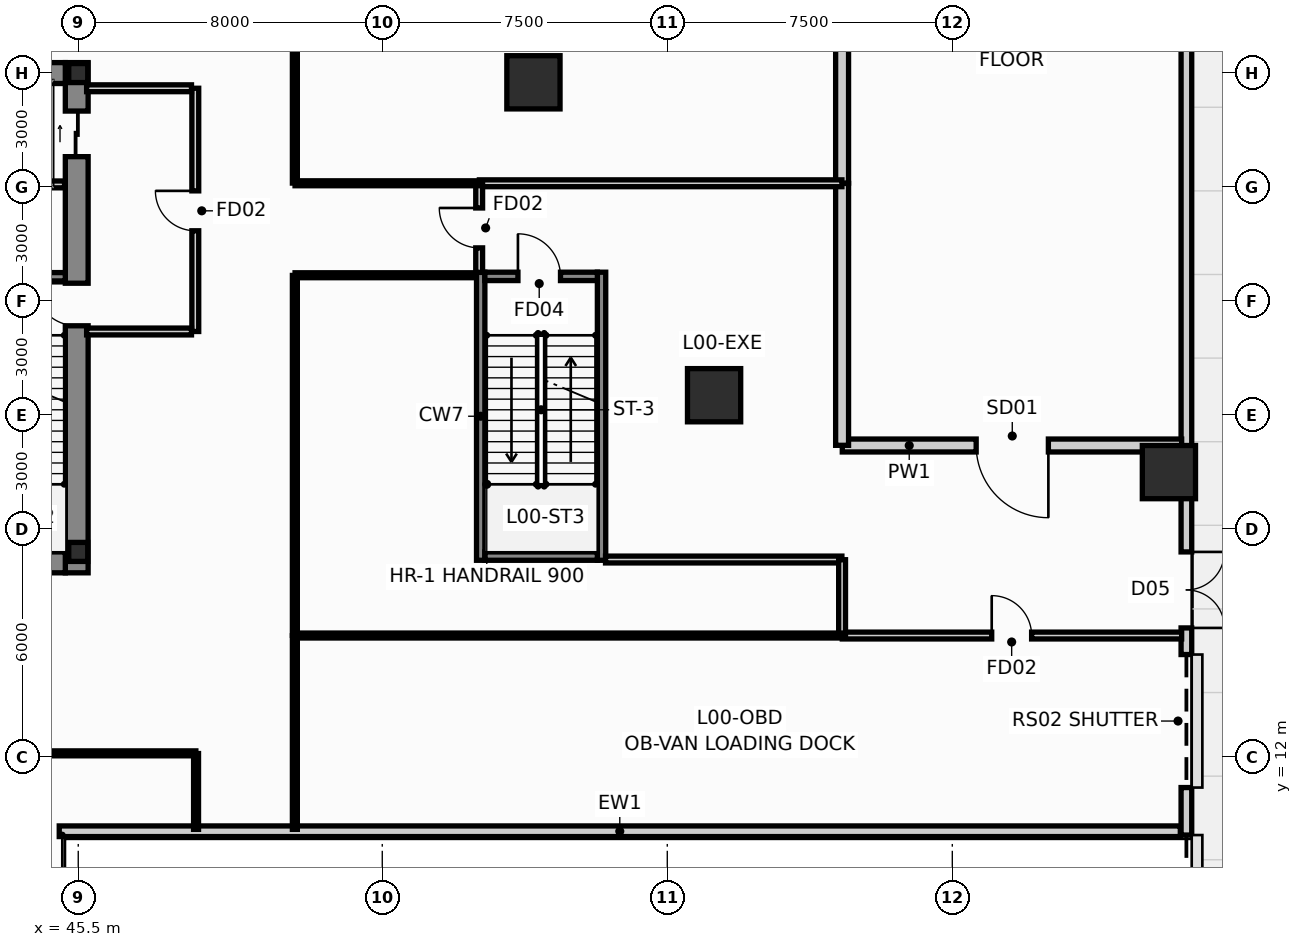
"""IFC4 building model, lengths in metres.
Left out: names, types, materials, properties, quantities, classifications, styles, units other than length and angle.
Written with IfcOpenShell. Run it as: python <this file> out.ifc"""

import sys

from ifc_helpers import new_model, si_unit, direction, frame, frame_2d, origin, origin_2d, place, context, subcontext, project, spatial, rectangle, hollow_rectangle, i_section, extrude, source, transform, mapped, element, fill, save


model = new_model("IFC4")
c1 = context("Model", 3, precision=1e-05, world=origin(), true_north=direction((0.0, 1.0)))
c2 = subcontext(c1, "Body", "Model", "MODEL_VIEW")
j1 = project(units=[si_unit("LENGTHUNIT", "METRE"), si_unit("PLANEANGLEUNIT", "RADIAN")], contexts=[c1])
p1 = place(None, origin())
s1 = spatial("IfcSite", under=j1, at=p1, CompositionType="ELEMENT")
p2 = place(p1, origin())
s2 = spatial("IfcBuilding", under=s1, at=p2, CompositionType="ELEMENT")
p3 = place(p2, origin())
s3 = spatial("IfcBuildingStorey", under=s2, at=p3, CompositionType="ELEMENT", Elevation=0.0)
m1 = source(origin(), c2, "Body", "SweptSolid", [
    extrude(i_section(OverallWidth=0.5, OverallDepth=0.5, WebThickness=0.028, FlangeThickness=0.04, at=origin_2d()), origin(), (0.0, 0.0, 1.0), 5.4),
])
for number, where, z_axis, x_axis in (
    (1, (45.5, 17.4, 0.0), (0.0, 0.0, 1.0), (1.0, 0.0, 0.0)),
    (2, (45.5, 30.0, 0.0), (0.0, 0.0, 1.0), (1.0, 0.0, 0.0)),
):
    element("IfcColumn", number, at=place(p3, frame(where, z_axis=z_axis, x_axis=x_axis)), inside=s3, PredefinedType="COLUMN", context=c2, shape_type="MappedRepresentation", body=[
        mapped(m1, transform((0.0, 0.0, 0.0), scale=1.0)),
    ])
p4 = place(p3, frame((45.46, 16.85, 0.0), z_axis=(0.0, 0.0, 1.0), x_axis=(0.0, 1.0, 0.0)))
e3 = element("IfcWall", 3, at=p4, inside=s3, PredefinedType="SHEAR", context=c2, shape_type="SweptSolid", body=[
    extrude(rectangle(XDim=13.425, YDim=0.6, at=frame_2d((6.712, 0.0))), origin(), (0.0, 0.0, 1.0), 5.4),
])
p5 = place(p4, frame((6.5, 0.0, 0.0)))
e4 = element("IfcOpeningElement", 4, at=p5, cuts=e3, PredefinedType="OPENING", context=c2, shape_type="SweptSolid", body=[
    extrude(rectangle(XDim=1.12, YDim=2.15, at=frame_2d((0.56, 1.075))), frame((0.0, 0.312, 0.0), z_axis=(0.0, -1.0, 0.0), x_axis=(1.0, 0.0, 0.0)), (0.0, 0.0, 1.0), 0.624),
])
p6 = place(p4, frame((10.95, 0.0, 0.0)))
e5 = element("IfcOpeningElement", 5, at=p6, cuts=e3, PredefinedType="OPENING", context=c2, shape_type="SweptSolid", body=[
    extrude(rectangle(XDim=1.2, YDim=2.2, at=frame_2d((0.6, 1.1))), frame((0.0, 0.312, 0.0), z_axis=(0.0, -1.0, 0.0), x_axis=(1.0, 0.0, 0.0)), (0.0, 0.0, 1.0), 0.624),
])
for number, where, z_axis, x_axis in (
    (6, (42.26, 17.125, 0.0), (0.0, 0.0, 1.0), (1.0, 0.0, 0.0)),
    (7, (42.26, 30.0, 0.0), (0.0, 0.0, 1.0), (1.0, 0.0, 0.0)),
):
    element("IfcWall", number, at=place(p3, frame(where, z_axis=z_axis, x_axis=x_axis)), inside=s3, PredefinedType="SHEAR", context=c2, shape_type="SweptSolid", body=[
        extrude(rectangle(XDim=2.9, YDim=0.55, at=frame_2d((1.45, 0.0))), origin(), (0.0, 0.0, 1.0), 5.4),
    ])
p7 = place(p3, frame((42.26, 24.64, 0.0), z_axis=(0.0, 0.0, 1.0), x_axis=(1.0, 0.0, 0.0)))
e8 = element("IfcWall", 8, at=p7, inside=s3, PredefinedType="SHEAR", context=c2, shape_type="SweptSolid", body=[
    extrude(rectangle(XDim=2.9, YDim=0.22, at=frame_2d((1.45, 0.0))), origin(), (0.0, 0.0, 1.0), 5.4),
])
for number, where, z_axis, x_axis in (
    (9, (56.09, 17.18, 0.0), (0.0, 0.0, 1.0), (0.0, 1.0, 0.0)),
    (10, (59.27, 17.18, 0.0), (0.0, 0.0, 1.0), (0.0, 1.0, 0.0)),
):
    element("IfcWall", number, at=place(p3, frame(where, z_axis=z_axis, x_axis=x_axis)), inside=s3, PredefinedType="SHEAR", context=c2, shape_type="SweptSolid", body=[
        extrude(rectangle(XDim=7.58, YDim=0.22, at=frame_2d((3.79, 0.0))), origin(), (0.0, 0.0, 1.0), 5.4),
    ])
p8 = place(p3, frame((56.2, 17.29, 0.0), z_axis=(0.0, 0.0, 1.0), x_axis=(1.0, 0.0, 0.0)))
e11 = element("IfcWall", 11, at=p8, inside=s3, PredefinedType="SHEAR", context=c2, shape_type="SweptSolid", body=[
    extrude(rectangle(XDim=2.96, YDim=0.22, at=frame_2d((1.48, 0.0))), origin(), (0.0, 0.0, 1.0), 5.4),
])
p9 = place(p3, frame((56.2, 24.65, 0.0), z_axis=(0.0, 0.0, 1.0), x_axis=(1.0, 0.0, 0.0)))
e12 = element("IfcWall", 12, at=p9, inside=s3, PredefinedType="SHEAR", context=c2, shape_type="SweptSolid", body=[
    extrude(rectangle(XDim=2.96, YDim=0.22, at=frame_2d((1.48, 0.0))), origin(), (0.0, 0.0, 1.0), 5.4),
])
p10 = place(p9, frame((0.87, 0.0, 0.0)))
e13 = element("IfcOpeningElement", 13, at=p10, cuts=e12, PredefinedType="OPENING", context=c2, shape_type="SweptSolid", body=[
    extrude(rectangle(XDim=1.12, YDim=2.15, at=frame_2d((0.56, 1.075))), frame((0.0, 0.122, 0.0), z_axis=(0.0, -1.0, 0.0), x_axis=(1.0, 0.0, 0.0)), (0.0, 0.0, 1.0), 0.244),
])
m2 = source(origin(), c2, "Body", "SweptSolid", [
    extrude(hollow_rectangle(XDim=1.4, YDim=1.4, WallThickness=0.08, at=origin_2d()), origin(), (0.0, 0.0, 1.0), 5.401),
])
p11 = place(p3, frame((62.231, 21.523, 0.0), z_axis=(-0.010395791054, -0.021559966664, 0.999713506644), x_axis=(0.900755489191, -0.434326546151, 0.0)))
e14 = element("IfcColumn", 14, at=p11, inside=s3, PredefinedType="COLUMN", context=c2, shape_type="MappedRepresentation", body=[
    mapped(m2, transform((0.0, 0.0, 0.0), scale=1.0)),
])
m3 = source(origin(), c2, "Body", "SweptSolid", [
    extrude(hollow_rectangle(XDim=1.4, YDim=1.4, WallThickness=0.08, at=origin_2d()), origin(), (0.0, 0.0, 1.0), 5.401),
])
p12 = place(p3, frame((57.478, 29.757, 0.0), z_axis=(-0.014916896444, -0.013786828532, 0.999793683497), x_axis=(0.678742109025, -0.734376708125, 0.0)))
e15 = element("IfcColumn", 15, at=p12, inside=s3, PredefinedType="COLUMN", context=c2, shape_type="MappedRepresentation", body=[
    mapped(m3, transform((0.0, 0.0, 0.0), scale=1.0)),
])
m4 = source(origin(), c2, "Body", "SweptSolid", [
    extrude(hollow_rectangle(XDim=1.4, YDim=1.4, WallThickness=0.08, at=origin_2d()), origin(), (0.0, 0.0, 1.0), 5.4),
])
p13 = place(p3, frame((74.2, 19.5, 0.0), z_axis=(0.0, 0.0, 1.0), x_axis=(1.0, 0.0, 0.0)))
e16 = element("IfcColumn", 16, at=p13, inside=s3, PredefinedType="COLUMN", context=c2, shape_type="MappedRepresentation", body=[
    mapped(m4, transform((0.0, 0.0, 0.0), scale=1.0)),
])
p14 = place(p3, frame((45.0, 10.05, 0.0), z_axis=(0.0, 0.0, 1.0), x_axis=(1.0, 0.0, 0.0)))
e17 = element("IfcWall", 17, at=p14, inside=s3, PredefinedType="STANDARD", context=c2, shape_type="SweptSolid", body=[
    extrude(rectangle(XDim=29.5, YDim=0.28, at=frame_2d((14.75, 0.0))), origin(), (0.0, 0.0, 1.0), 5.08),
])
p15 = place(p3, frame((74.66, 50.2, 0.0), z_axis=(0.0, 0.0, 1.0), x_axis=(0.0, -1.0, 0.0)))
e18 = element("IfcWall", 18, at=p15, inside=s3, PredefinedType="STANDARD", context=c2, shape_type="SweptSolid", body=[
    extrude(rectangle(XDim=46.4, YDim=0.28, at=frame_2d((23.2, 0.0))), origin(), (0.0, 0.0, 1.0), 4.065),
])
p16 = place(p15, frame((40.25, 0.0, 0.0)))
e19 = element("IfcOpeningElement", 19, at=p16, cuts=e18, PredefinedType="OPENING", context=c2, shape_type="SweptSolid", body=[
    extrude(rectangle(XDim=3.9, YDim=3.55, at=frame_2d((1.95, 1.775))), frame((0.0, 0.152, 0.0), z_axis=(0.0, -1.0, 0.0), x_axis=(1.0, 0.0, 0.0)), (0.0, 0.0, 1.0), 0.304),
])
p17 = place(p15, frame((35.5, 0.0, 0.0)))
e20 = element("IfcOpeningElement", 20, at=p17, cuts=e18, PredefinedType="OPENING", context=c2, shape_type="SweptSolid", body=[
    extrude(rectangle(XDim=3.5, YDim=3.55, at=frame_2d((1.75, 1.775))), frame((0.0, 0.152, 0.0), z_axis=(0.0, -1.0, 0.0), x_axis=(1.0, 0.0, 0.0)), (0.0, 0.0, 1.0), 0.304),
])
p18 = place(p15, frame((32.8, 0.0, 0.0)))
e21 = element("IfcOpeningElement", 21, at=p18, cuts=e18, PredefinedType="OPENING", context=c2, shape_type="SweptSolid", body=[
    extrude(rectangle(XDim=2.0, YDim=2.4, at=frame_2d((1.0, 1.2))), frame((0.0, 0.152, 0.0), z_axis=(0.0, -1.0, 0.0), x_axis=(1.0, 0.0, 0.0)), (0.0, 0.0, 1.0), 0.304),
])
p19 = place(p3, frame((48.58, 23.2, 0.0), z_axis=(0.0, 0.0, 1.0), x_axis=(0.0, 1.0, 0.0)))
e22 = element("IfcWall", 22, at=p19, inside=s3, PredefinedType="PARTITIONING", context=c2, shape_type="SweptSolid", body=[
    extrude(rectangle(XDim=6.4, YDim=0.18, at=frame_2d((3.2, 0.0))), origin(), (0.0, 0.0, 1.0), 5.08),
])
p20 = place(p19, frame((2.65, 0.0, 0.0)))
e23 = element("IfcOpeningElement", 23, at=p20, cuts=e22, PredefinedType="OPENING", context=c2, shape_type="SweptSolid", body=[
    extrude(rectangle(XDim=1.05, YDim=2.15, at=frame_2d((0.525, 1.075))), frame((0.0, 0.102, 0.0), z_axis=(0.0, -1.0, 0.0), x_axis=(1.0, 0.0, 0.0)), (0.0, 0.0, 1.0), 0.204),
])
p21 = place(p3, frame((45.72, 23.2, 0.0), z_axis=(0.0, 0.0, 1.0), x_axis=(1.0, 0.0, 0.0)))
e24 = element("IfcWall", 24, at=p21, inside=s3, PredefinedType="PARTITIONING", context=c2, shape_type="SweptSolid", body=[
    extrude(rectangle(XDim=2.76, YDim=0.18, at=frame_2d((1.38, 0.0))), origin(), (0.0, 0.0, 1.0), 5.08),
])
p22 = place(p3, frame((45.72, 29.6, 0.0), z_axis=(0.0, 0.0, 1.0), x_axis=(1.0, 0.0, 0.0)))
e25 = element("IfcWall", 25, at=p22, inside=s3, PredefinedType="PARTITIONING", context=c2, shape_type="SweptSolid", body=[
    extrude(rectangle(XDim=2.76, YDim=0.18, at=frame_2d((1.38, 0.0))), origin(), (0.0, 0.0, 1.0), 4.453),
])
p23 = place(p3, frame((42.24, 27.07, 0.0), z_axis=(0.0, 0.0, 1.0), x_axis=(1.0, 0.0, 0.0)))
e26 = element("IfcWall", 26, at=p23, inside=s3, PredefinedType="PARTITIONING", context=c2, shape_type="SweptSolid", body=[
    extrude(rectangle(XDim=2.9, YDim=0.18, at=frame_2d((1.45, 0.0))), origin(), (0.0, 0.0, 1.0), 5.08),
])
p24 = place(p3, frame((74.535, 20.2, 0.0), z_axis=(0.0, 0.0, 1.0), x_axis=(-1.0, 0.0, 0.0)))
e27 = element("IfcWall", 27, at=p24, inside=s3, PredefinedType="PARTITIONING", context=c2, shape_type="SweptSolid", body=[
    extrude(rectangle(XDim=8.93, YDim=0.34, at=frame_2d((4.465, 0.0))), origin(), (0.0, 0.0, 1.0), 4.065),
])
p25 = place(p24, frame((3.507, 0.0, 0.0)))
e28 = element("IfcOpeningElement", 28, at=p25, cuts=e27, PredefinedType="OPENING", context=c2, shape_type="SweptSolid", body=[
    extrude(rectangle(XDim=1.9, YDim=2.35, at=frame_2d((0.95, 1.175))), frame((0.0, 0.182, 0.0), z_axis=(0.0, -1.0, 0.0), x_axis=(1.0, 0.0, 0.0)), (0.0, 0.0, 1.0), 0.364),
])
p26 = place(p3, frame((65.6, 20.205, 0.0), z_axis=(0.0, 0.0, 1.0), x_axis=(0.0, 1.0, 0.0)))
e29 = element("IfcWall", 29, at=p26, inside=s3, PredefinedType="PARTITIONING", context=c2, shape_type="SweptSolid", body=[
    extrude(rectangle(XDim=6.89, YDim=0.34, at=frame_2d((3.445, 0.0))), origin(), (0.0, 0.0, 1.0), 5.08),
])
p27 = place(p3, frame((65.6, 27.105, 0.0), z_axis=(0.0, 0.0, 1.0), x_axis=(0.0, 1.0, 0.0)))
e30 = element("IfcWall", 30, at=p27, inside=s3, PredefinedType="PARTITIONING", context=c2, shape_type="SweptSolid", body=[
    extrude(rectangle(XDim=4.39, YDim=0.34, at=frame_2d((2.195, 0.0))), origin(), (0.0, 0.0, 1.0), 5.08),
])
p28 = place(p3, frame((56.055, 27.1, 0.0), z_axis=(0.0, 0.0, 1.0), x_axis=(1.0, 0.0, 0.0)))
e31 = element("IfcWall", 31, at=p28, inside=s3, PredefinedType="PARTITIONING", context=c2, shape_type="SweptSolid", body=[
    extrude(rectangle(XDim=9.54, YDim=0.18, at=frame_2d((4.77, 0.0))), origin(), (0.0, 0.0, 1.0), 5.08),
])
p29 = place(p3, frame((65.605, 15.2, 0.0), z_axis=(0.0, 0.0, 1.0), x_axis=(1.0, 0.0, 0.0)))
e32 = element("IfcWall", 32, at=p29, inside=s3, PredefinedType="PARTITIONING", context=c2, shape_type="SweptSolid", body=[
    extrude(rectangle(XDim=8.93, YDim=0.18, at=frame_2d((4.465, 0.0))), origin(), (0.0, 0.0, 1.0), 5.08),
])
p30 = place(p29, frame((3.932, 0.0, 0.0)))
e33 = element("IfcOpeningElement", 33, at=p30, cuts=e32, PredefinedType="OPENING", context=c2, shape_type="SweptSolid", body=[
    extrude(rectangle(XDim=1.05, YDim=2.15, at=frame_2d((0.525, 1.075))), frame((0.0, 0.102, 0.0), z_axis=(0.0, -1.0, 0.0), x_axis=(1.0, 0.0, 0.0)), (0.0, 0.0, 1.0), 0.204),
])
p31 = place(p3, frame((65.595, 17.2, 0.0), z_axis=(0.0, 0.0, 1.0), x_axis=(-1.0, 0.0, 0.0)))
e34 = element("IfcWall", 34, at=p31, inside=s3, PredefinedType="PARTITIONING", context=c2, shape_type="SweptSolid", body=[
    extrude(rectangle(XDim=6.22, YDim=0.18, at=frame_2d((3.11, 0.0))), origin(), (0.0, 0.0, 1.0), 5.08),
])
p32 = place(p3, frame((56.05, 24.755, 0.0), z_axis=(0.0, 0.0, 1.0), x_axis=(0.0, 1.0, 0.0)))
e35 = element("IfcWall", 35, at=p32, inside=s3, PredefinedType="PARTITIONING", context=c2, shape_type="SweptSolid", body=[
    extrude(rectangle(XDim=2.34, YDim=0.18, at=frame_2d((1.17, 0.0))), origin(), (0.0, 0.0, 1.0), 5.08),
])
p33 = place(p32, frame((0.645, 0.0, 0.0)))
e36 = element("IfcOpeningElement", 36, at=p33, cuts=e35, PredefinedType="OPENING", context=c2, shape_type="SweptSolid", body=[
    extrude(rectangle(XDim=1.05, YDim=2.15, at=frame_2d((0.525, 1.075))), frame((0.0, 0.102, 0.0), z_axis=(0.0, -1.0, 0.0), x_axis=(1.0, 0.0, 0.0)), (0.0, 0.0, 1.0), 0.204),
])
p34 = place(p3, frame((65.6, 15.205, 0.0), z_axis=(0.0, 0.0, 1.0), x_axis=(0.0, 1.0, 0.0)))
e37 = element("IfcWall", 37, at=p34, inside=s3, PredefinedType="PARTITIONING", context=c2, shape_type="SweptSolid", body=[
    extrude(rectangle(XDim=1.99, YDim=0.18, at=frame_2d((0.995, 0.0))), origin(), (0.0, 0.0, 1.0), 5.08),
])
p35 = place(p3, frame((51.205, 15.2, 0.0), z_axis=(0.0, 0.0, 1.0), x_axis=(1.0, 0.0, 0.0)))
e38 = element("IfcWall", 38, at=p35, inside=s3, PredefinedType="PARTITIONING", context=c2, shape_type="SweptSolid", body=[
    extrude(rectangle(XDim=14.39, YDim=0.13, at=frame_2d((7.195, 0.0))), origin(), (0.0, 0.0, 1.0), 5.08),
])
p36 = place(p3, frame((38.005, 12.1, 0.0), z_axis=(0.0, 0.0, 1.0), x_axis=(1.0, 0.0, 0.0)))
e39 = element("IfcWall", 39, at=p36, inside=s3, PredefinedType="PARTITIONING", context=c2, shape_type="SweptSolid", body=[
    extrude(rectangle(XDim=10.59, YDim=0.13, at=frame_2d((5.295, 0.0))), origin(), (0.0, 0.0, 1.0), 5.08),
])
p37 = place(p3, frame((51.2, 15.205, 0.0), z_axis=(0.0, 0.0, 1.0), x_axis=(0.0, 1.0, 0.0)))
e40 = element("IfcWall", 40, at=p37, inside=s3, PredefinedType="PARTITIONING", context=c2, shape_type="SweptSolid", body=[
    extrude(rectangle(XDim=9.47, YDim=0.13, at=frame_2d((4.735, 0.0))), origin(), (0.0, 0.0, 1.0), 5.08),
])
p38 = place(p3, frame((51.2, 10.1, 0.0), z_axis=(0.0, 0.0, 1.0), x_axis=(0.0, 1.0, 0.0)))
e41 = element("IfcWall", 41, at=p38, inside=s3, PredefinedType="PARTITIONING", context=c2, shape_type="SweptSolid", body=[
    extrude(rectangle(XDim=5.095, YDim=0.13, at=frame_2d((2.547, 0.0))), origin(), (0.0, 0.0, 1.0), 5.08),
])
p39 = place(p3, frame((56.045, 27.1, 0.0), z_axis=(0.0, 0.0, 1.0), x_axis=(-1.0, 0.0, 0.0)))
e42 = element("IfcWall", 42, at=p39, inside=s3, PredefinedType="PARTITIONING", context=c2, shape_type="SweptSolid", body=[
    extrude(rectangle(XDim=4.84, YDim=0.13, at=frame_2d((2.42, 0.0))), origin(), (0.0, 0.0, 1.0), 5.08),
])
p40 = place(p3, frame((51.205, 24.68, 0.0), z_axis=(0.0, 0.0, 1.0), x_axis=(1.0, 0.0, 0.0)))
e43 = element("IfcWall", 43, at=p40, inside=s3, PredefinedType="PARTITIONING", context=c2, shape_type="SweptSolid", body=[
    extrude(rectangle(XDim=4.77, YDim=0.13, at=frame_2d((2.385, 0.0))), origin(), (0.0, 0.0, 1.0), 5.08),
])
p41 = place(p3, frame((51.2, 27.105, 0.0), z_axis=(0.0, 0.0, 1.0), x_axis=(0.0, 1.0, 0.0)))
e44 = element("IfcWall", 44, at=p41, inside=s3, PredefinedType="PARTITIONING", context=c2, shape_type="SweptSolid", body=[
    extrude(rectangle(XDim=4.39, YDim=0.13, at=frame_2d((2.195, 0.0))), origin(), (0.0, 0.0, 1.0), 5.08),
])
p42 = place(p3, frame((48.6, 12.095, 0.0), z_axis=(0.0, 0.0, 1.0), x_axis=(0.0, -1.0, 0.0)))
e45 = element("IfcWall", 45, at=p42, inside=s3, PredefinedType="PARTITIONING", context=c2, shape_type="SweptSolid", body=[
    extrude(rectangle(XDim=1.995, YDim=0.13, at=frame_2d((0.998, 0.0))), origin(), (0.0, 0.0, 1.0), 5.08),
])
p43 = place(p16, origin())
e46 = element("IfcDoor", 46, at=p43, inside=s3, OperationType="ROLLINGUP", PredefinedType="GATE", context=c2, shape_type="SweptSolid", body=[
    extrude(rectangle(XDim=3.9, YDim=3.55, at=frame_2d((1.95, 1.775))), frame((0.0, 0.025, 0.0), z_axis=(0.0, -1.0, 0.0), x_axis=(1.0, 0.0, 0.0)), (0.0, 0.0, 1.0), 0.05),
])
fill(e19, e46)
p44 = place(p17, origin())
e47 = element("IfcDoor", 47, at=p44, inside=s3, OperationType="ROLLINGUP", PredefinedType="GATE", context=c2, shape_type="SweptSolid", body=[
    extrude(rectangle(XDim=3.5, YDim=3.55, at=frame_2d((1.75, 1.775))), frame((0.0, 0.025, 0.0), z_axis=(0.0, -1.0, 0.0), x_axis=(1.0, 0.0, 0.0)), (0.0, 0.0, 1.0), 0.05),
])
fill(e20, e47)
p45 = place(p18, origin())
e48 = element("IfcDoor", 48, at=p45, inside=s3, OperationType="DOUBLE_DOOR_SINGLE_SWING", PredefinedType="DOOR", context=c2, shape_type="SweptSolid", body=[
    extrude(rectangle(XDim=2.0, YDim=2.4, at=frame_2d((1.0, 1.2))), frame((0.0, 0.025, 0.0), z_axis=(0.0, -1.0, 0.0), x_axis=(1.0, 0.0, 0.0)), (0.0, 0.0, 1.0), 0.05),
])
fill(e21, e48)
p46 = place(p5, origin())
e49 = element("IfcDoor", 49, at=p46, inside=s3, OperationType="SINGLE_SWING_RIGHT", PredefinedType="DOOR", context=c2, shape_type="SweptSolid", body=[
    extrude(rectangle(XDim=1.12, YDim=2.15, at=frame_2d((0.56, 1.075))), frame((0.0, 0.025, 0.0), z_axis=(0.0, -1.0, 0.0), x_axis=(1.0, 0.0, 0.0)), (0.0, 0.0, 1.0), 0.05),
])
fill(e4, e49)
p47 = place(p6, origin())
e50 = element("IfcDoor", 50, at=p47, inside=s3, OperationType="SLIDING_TO_RIGHT", PredefinedType="DOOR", context=c2, shape_type="SweptSolid", body=[
    extrude(rectangle(XDim=1.2, YDim=2.2, at=frame_2d((0.6, 1.1))), frame((0.0, 0.025, 0.0), z_axis=(0.0, -1.0, 0.0), x_axis=(1.0, 0.0, 0.0)), (0.0, 0.0, 1.0), 0.05),
])
fill(e5, e50)
p48 = place(p10, origin())
e51 = element("IfcDoor", 51, at=p48, inside=s3, OperationType="SINGLE_SWING_LEFT", PredefinedType="DOOR", context=c2, shape_type="SweptSolid", body=[
    extrude(rectangle(XDim=1.12, YDim=2.15, at=frame_2d((0.56, 1.075))), frame((0.0, 0.025, 0.0), z_axis=(0.0, -1.0, 0.0), x_axis=(1.0, 0.0, 0.0)), (0.0, 0.0, 1.0), 0.05),
])
fill(e13, e51)
p49 = place(p20, origin())
e52 = element("IfcDoor", 52, at=p49, inside=s3, OperationType="SINGLE_SWING_RIGHT", PredefinedType="DOOR", context=c2, shape_type="SweptSolid", body=[
    extrude(rectangle(XDim=1.05, YDim=2.15, at=frame_2d((0.525, 1.075))), frame((0.0, 0.025, 0.0), z_axis=(0.0, -1.0, 0.0), x_axis=(1.0, 0.0, 0.0)), (0.0, 0.0, 1.0), 0.05),
])
fill(e23, e52)
p50 = place(p25, origin())
e53 = element("IfcDoor", 53, at=p50, inside=s3, OperationType="DOUBLE_DOOR_SINGLE_SWING", PredefinedType="DOOR", context=c2, shape_type="SweptSolid", body=[
    extrude(rectangle(XDim=1.9, YDim=2.35, at=frame_2d((0.95, 1.175))), frame((0.0, 0.025, 0.0), z_axis=(0.0, -1.0, 0.0), x_axis=(1.0, 0.0, 0.0)), (0.0, 0.0, 1.0), 0.05),
])
fill(e28, e53)
p51 = place(p30, origin())
e54 = element("IfcDoor", 54, at=p51, inside=s3, OperationType="SINGLE_SWING_LEFT", PredefinedType="DOOR", context=c2, shape_type="SweptSolid", body=[
    extrude(rectangle(XDim=1.05, YDim=2.15, at=frame_2d((0.525, 1.075))), frame((0.0, 0.025, 0.0), z_axis=(0.0, -1.0, 0.0), x_axis=(1.0, 0.0, 0.0)), (0.0, 0.0, 1.0), 0.05),
])
fill(e33, e54)
p52 = place(p33, origin())
e55 = element("IfcDoor", 55, at=p52, inside=s3, OperationType="SINGLE_SWING_RIGHT", PredefinedType="DOOR", context=c2, shape_type="SweptSolid", body=[
    extrude(rectangle(XDim=1.05, YDim=2.15, at=frame_2d((0.525, 1.075))), frame((0.0, 0.025, 0.0), z_axis=(0.0, -1.0, 0.0), x_axis=(1.0, 0.0, 0.0)), (0.0, 0.0, 1.0), 0.05),
])
fill(e36, e55)
save(model, sys.argv[1])
